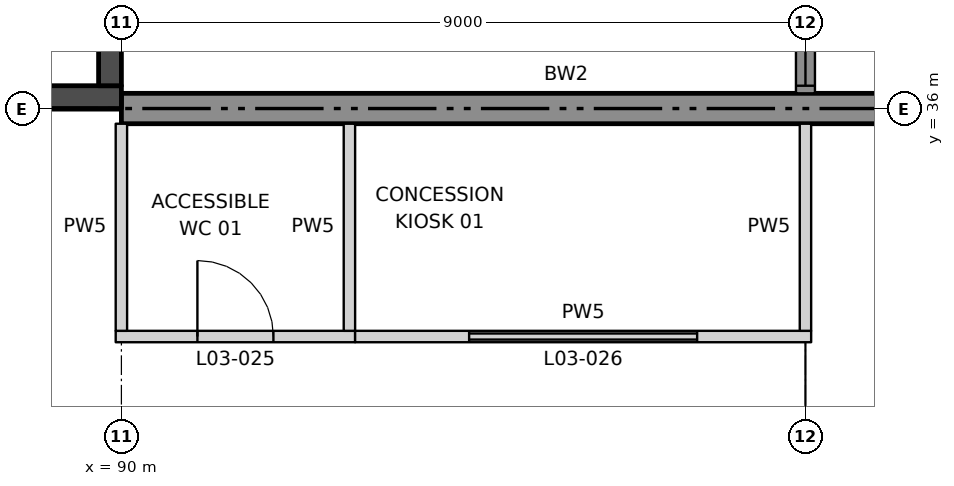
"""IFC4 building model, lengths in metres.
Left out: names, types, materials, properties, quantities, classifications, styles, units other than length and angle.
Written with IfcOpenShell. Run it as: python <this file> out.ifc"""

import sys

from ifc_helpers import new_model, si_unit, direction, frame, frame_2d, origin, place, context, subcontext, project, spatial, rectangle, extrude, element, fill, save


model = new_model("IFC4")
c1 = context("Model", 3, precision=1e-05, world=origin(), true_north=direction((0.0, 1.0)))
c2 = subcontext(c1, "Body", "Model", "MODEL_VIEW")
j1 = project(units=[si_unit("LENGTHUNIT", "METRE"), si_unit("PLANEANGLEUNIT", "RADIAN")], contexts=[c1])
p1 = place(None, origin())
s1 = spatial("IfcSite", under=j1, at=p1, CompositionType="ELEMENT")
p2 = place(p1, origin())
s2 = spatial("IfcBuilding", under=s1, at=p2, CompositionType="ELEMENT")
p3 = place(p2, frame((0.0, 0.0, 22.0)))
s3 = spatial("IfcBuildingStorey", under=s2, at=p3, CompositionType="ELEMENT", Elevation=22.0)
p4 = place(p3, frame((90.0, 36.0, 0.0), z_axis=(0.0, 0.0, 1.0), x_axis=(1.0, 0.0, 0.0)))
e1 = element("IfcWall", 1, at=p4, inside=s3, PredefinedType="SOLIDWALL", context=c2, shape_type="SweptSolid", body=[
    extrude(rectangle(XDim=11.7, YDim=0.4, at=frame_2d((5.85, 0.0))), origin(), (0.0, 0.0, 1.0), 6.0),
])
p5 = place(p3, frame((89.925, 33.0, 0.0), z_axis=(0.0, 0.0, 1.0), x_axis=(1.0, 0.0, 0.0)))
e2 = element("IfcWall", 2, at=p5, inside=s3, PredefinedType="PARTITIONING", context=c2, shape_type="SweptSolid", body=[
    extrude(rectangle(XDim=3.15, YDim=0.15, at=frame_2d((1.575, 0.0))), origin(), (0.0, 0.0, 1.0), 6.0),
])
p6 = place(p5, frame((1.075, 0.0, 0.0)))
e3 = element("IfcOpeningElement", 3, at=p6, cuts=e2, PredefinedType="OPENING", context=c2, shape_type="SweptSolid", body=[
    extrude(rectangle(XDim=1.0, YDim=2.1, at=frame_2d((0.5, 1.05))), frame((0.0, 0.085, 0.0), z_axis=(0.0, -1.0, 0.0), x_axis=(1.0, 0.0, 0.0)), (0.0, 0.0, 1.0), 0.17),
])
p7 = place(p3, frame((93.075, 33.0, 0.0), z_axis=(0.0, 0.0, 1.0), x_axis=(1.0, 0.0, 0.0)))
e4 = element("IfcWall", 4, at=p7, inside=s3, PredefinedType="PARTITIONING", context=c2, shape_type="SweptSolid", body=[
    extrude(rectangle(XDim=6.0, YDim=0.15, at=frame_2d((3.0, 0.0))), origin(), (0.0, 0.0, 1.0), 6.0),
])
p8 = place(p7, frame((1.5, 0.0, 0.0)))
e5 = element("IfcOpeningElement", 5, at=p8, cuts=e4, PredefinedType="OPENING", context=c2, shape_type="SweptSolid", body=[
    extrude(rectangle(XDim=3.0, YDim=2.4, at=frame_2d((1.5, 1.2))), frame((0.0, 0.085, 0.0), z_axis=(0.0, -1.0, 0.0), x_axis=(1.0, 0.0, 0.0)), (0.0, 0.0, 1.0), 0.17),
])
p9 = place(p3, frame((90.0, 33.075, 0.0), z_axis=(0.0, 0.0, 1.0), x_axis=(0.0, 1.0, 0.0)))
e6 = element("IfcWall", 6, at=p9, inside=s3, PredefinedType="PARTITIONING", context=c2, shape_type="SweptSolid", body=[
    extrude(rectangle(XDim=2.725, YDim=0.15, at=frame_2d((1.363, 0.0))), origin(), (0.0, 0.0, 1.0), 4.7),
])
p10 = place(p3, frame((93.0, 33.075, 0.0), z_axis=(0.0, 0.0, 1.0), x_axis=(0.0, 1.0, 0.0)))
e7 = element("IfcWall", 7, at=p10, inside=s3, PredefinedType="PARTITIONING", context=c2, shape_type="SweptSolid", body=[
    extrude(rectangle(XDim=2.725, YDim=0.15, at=frame_2d((1.363, 0.0))), origin(), (0.0, 0.0, 1.0), 6.0),
])
p11 = place(p3, frame((99.0, 33.075, 0.0), z_axis=(0.0, 0.0, 1.0), x_axis=(0.0, 1.0, 0.0)))
e8 = element("IfcWall", 8, at=p11, inside=s3, PredefinedType="PARTITIONING", context=c2, shape_type="SweptSolid", body=[
    extrude(rectangle(XDim=2.725, YDim=0.15, at=frame_2d((1.363, 0.0))), origin(), (0.0, 0.0, 1.0), 4.7),
])
p12 = place(p3, frame((90.0, 36.15, 0.0), z_axis=(0.0, 0.0, 1.0), x_axis=(-1.0, 0.0, 0.0)))
e9 = element("IfcWall", 9, at=p12, inside=s3, PredefinedType="SHEAR", context=c2, shape_type="SweptSolid", body=[
    extrude(rectangle(XDim=18.0, YDim=0.3, at=frame_2d((9.0, 0.0))), origin(), (0.0, 0.0, 1.0), 6.0),
])
p13 = place(p3, frame((89.85, 44.7, 0.0), z_axis=(0.0, 0.0, 1.0), x_axis=(0.0, -1.0, 0.0)))
e10 = element("IfcWall", 10, at=p13, inside=s3, PredefinedType="SHEAR", context=c2, shape_type="SweptSolid", body=[
    extrude(rectangle(XDim=8.4, YDim=0.3, at=frame_2d((4.2, 0.0))), origin(), (0.0, 0.0, 1.0), 6.0),
])
p14 = place(p3, frame((99.0, 37.8, 0.0), z_axis=(0.0, 0.0, 1.0), x_axis=(0.0, -1.0, 0.0)))
e11 = element("IfcWall", 11, at=p14, inside=s3, PredefinedType="SOLIDWALL", context=c2, shape_type="SweptSolid", body=[
    extrude(rectangle(XDim=1.6, YDim=0.25, at=frame_2d((0.8, 0.0))), origin(), (0.0, 0.0, 1.0), 4.8),
])
p15 = place(p14, frame((0.1, 0.0, 0.0)))
e12 = element("IfcOpeningElement", 12, at=p15, cuts=e11, PredefinedType="OPENING", context=c2, shape_type="SweptSolid", body=[
    extrude(rectangle(XDim=1.4, YDim=2.4, at=frame_2d((0.7, 1.2))), frame((0.0, 0.135, 0.0), z_axis=(0.0, -1.0, 0.0), x_axis=(1.0, 0.0, 0.0)), (0.0, 0.0, 1.0), 0.27),
])
p16 = place(p6, origin())
e13 = element("IfcDoor", 13, at=p16, inside=s3, OperationType="SINGLE_SWING_LEFT", PredefinedType="DOOR", context=c2, shape_type="SweptSolid", body=[
    extrude(rectangle(XDim=1.0, YDim=2.1, at=frame_2d((0.5, 1.05))), frame((0.0, 0.025, 0.0), z_axis=(0.0, -1.0, 0.0), x_axis=(1.0, 0.0, 0.0)), (0.0, 0.0, 1.0), 0.05),
])
fill(e3, e13)
p17 = place(p8, origin())
e14 = element("IfcDoor", 14, at=p17, inside=s3, OperationType="ROLLINGUP", PredefinedType="DOOR", context=c2, shape_type="SweptSolid", body=[
    extrude(rectangle(XDim=3.0, YDim=2.4, at=frame_2d((1.5, 1.2))), frame((0.0, 0.025, 0.0), z_axis=(0.0, -1.0, 0.0), x_axis=(1.0, 0.0, 0.0)), (0.0, 0.0, 1.0), 0.05),
])
fill(e5, e14)
p18 = place(p15, frame((1.4, 0.0, 0.0), z_axis=(0.0, 0.0, 1.0), x_axis=(-1.0, 0.0, 0.0)))
e15 = element("IfcDoor", 15, at=p18, inside=s3, OperationType="DOUBLE_DOOR_SINGLE_SWING", PredefinedType="DOOR", context=c2, shape_type="SweptSolid", body=[
    extrude(rectangle(XDim=1.4, YDim=2.4, at=frame_2d((0.7, 1.2))), frame((0.0, 0.025, 0.0), z_axis=(0.0, -1.0, 0.0), x_axis=(1.0, 0.0, 0.0)), (0.0, 0.0, 1.0), 0.05),
])
fill(e12, e15)
save(model, sys.argv[1])
